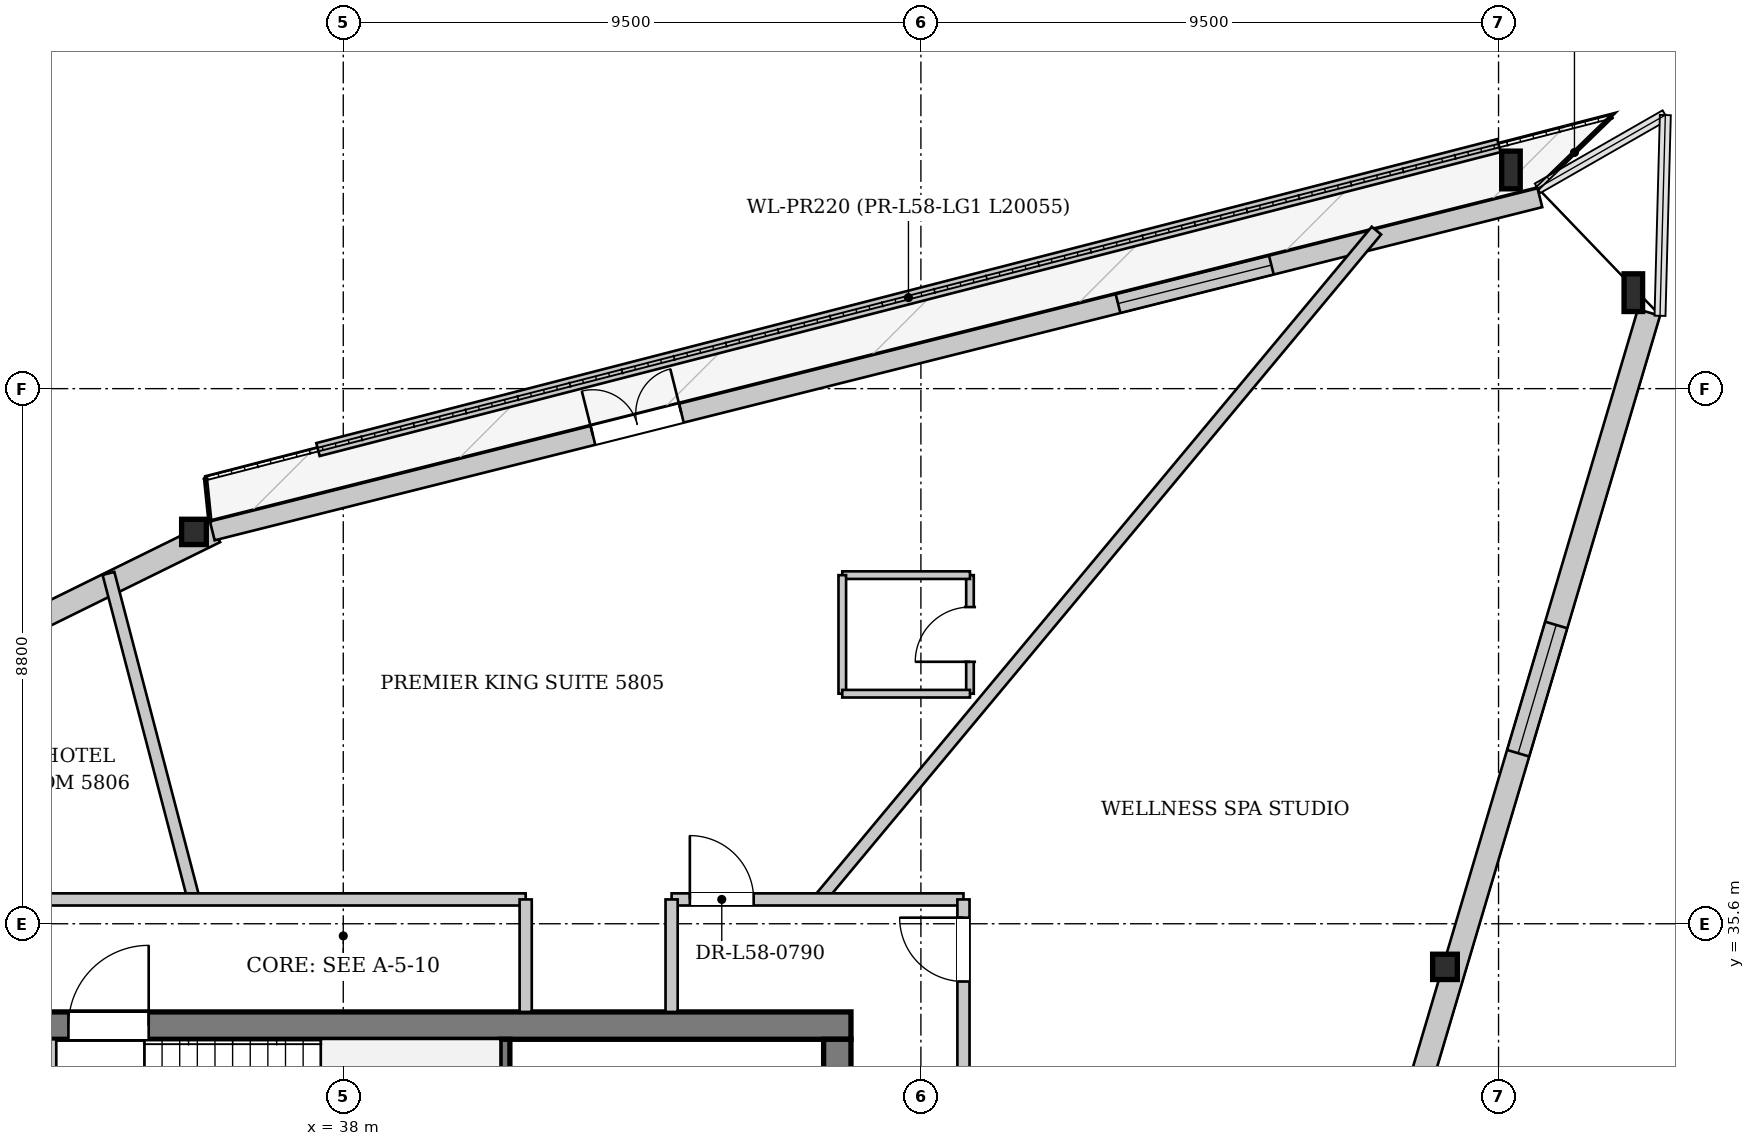
"""IFC4 building model, lengths in metres.
Left out: names, types, materials, properties, quantities, classifications, styles, units other than length and angle.
Written with IfcOpenShell. Run it as: python <this file> out.ifc"""

import sys

from ifc_helpers import new_model, si_unit, direction, frame, frame_2d, origin, origin_2d, place, context, subcontext, project, spatial, rectangle, i_section, extrude, source, transform, mapped, element, fill, save


model = new_model("IFC4")
c1 = context("Model", 3, precision=1e-05, world=origin(), true_north=direction((0.0, 1.0)))
c2 = subcontext(c1, "Body", "Model", "MODEL_VIEW")
j1 = project(units=[si_unit("LENGTHUNIT", "METRE"), si_unit("PLANEANGLEUNIT", "RADIAN")], contexts=[c1])
p1 = place(None, origin())
s1 = spatial("IfcSite", under=j1, at=p1, CompositionType="ELEMENT")
p2 = place(p1, origin())
s2 = spatial("IfcBuilding", under=s1, at=p2, CompositionType="ELEMENT")
p3 = place(p2, frame((0.0, 0.0, 220.25)))
s3 = spatial("IfcBuildingStorey", under=s2, at=p3, CompositionType="ELEMENT", Elevation=220.25)
m1 = source(origin(), c2, "Body", "SweptSolid", [
    extrude(i_section(OverallWidth=0.305, OverallDepth=0.62, WebThickness=0.021, FlangeThickness=0.04, at=origin_2d()), origin(), (0.0, 0.0, 1.0), 3.579),
])
p4 = place(p3, frame((59.656, 45.598, 0.0), z_axis=(-0.245246591305, 0.2126380042, 0.94585368246), x_axis=(-0.65509054937, -0.755550376961, 0.0)))
e1 = element("IfcColumn", 1, at=p4, inside=s3, PredefinedType="COLUMN", context=c2, shape_type="MappedRepresentation", body=[
    mapped(m1, transform((0.0, 0.0, 0.0), x_axis=(1.0, 0.0, 0.0), y_axis=(0.0, 1.0, 0.0), z_axis=(0.0, 0.0, 1.0), scale=1.0)),
])
m2 = source(origin(), c2, "Body", "SweptSolid", [
    extrude(i_section(OverallWidth=0.305, OverallDepth=0.62, WebThickness=0.021, FlangeThickness=0.04, at=origin_2d()), origin(), (0.0, 0.0, 1.0), 3.548),
])
p5 = place(p3, frame((57.641, 47.695, 0.0), z_axis=(-0.246375224897, 0.169778681514, 0.954187847261), x_axis=(-0.567426549776, -0.823424016294, 0.0)))
e2 = element("IfcColumn", 2, at=p5, inside=s3, PredefinedType="COLUMN", context=c2, shape_type="MappedRepresentation", body=[
    mapped(m2, transform((0.0, 0.0, 0.0), x_axis=(1.0, 0.0, 0.0), y_axis=(0.0, 1.0, 0.0), z_axis=(0.0, 0.0, 1.0), scale=1.0)),
])
m3 = source(origin(), c2, "Body", "SweptSolid", [
    extrude(i_section(OverallWidth=0.406, OverallDepth=0.416, WebThickness=0.027, FlangeThickness=0.042, at=origin_2d()), origin(), (0.0, 0.0, 1.0), 3.443),
])
p6 = place(p3, frame((35.807, 42.216, 0.0), z_axis=(-0.152464136085, -0.100200848506, 0.983216393866), x_axis=(0.549216666266, -0.835679994672, 0.0)))
e3 = element("IfcColumn", 3, at=p6, inside=s3, PredefinedType="COLUMN", context=c2, shape_type="MappedRepresentation", body=[
    mapped(m3, transform((0.0, 0.0, 0.0), x_axis=(1.0, 0.0, 0.0), y_axis=(0.0, 1.0, 0.0), z_axis=(0.0, 0.0, 1.0), scale=1.0)),
])
m4 = source(origin(), c2, "Body", "SweptSolid", [
    extrude(i_section(OverallWidth=0.406, OverallDepth=0.416, WebThickness=0.027, FlangeThickness=0.042, at=origin_2d()), origin(), (0.0, 0.0, 1.0), 3.495),
])
p7 = place(p3, frame((56.373, 34.539, 0.0), z_axis=(-0.145518406884, 0.201546137235, 0.968609078949), x_axis=(-0.810760735257, -0.585377681643, 0.0)))
e4 = element("IfcColumn", 4, at=p7, inside=s3, PredefinedType="COLUMN", context=c2, shape_type="MappedRepresentation", body=[
    mapped(m4, transform((0.0, 0.0, 0.0), x_axis=(1.0, 0.0, 0.0), y_axis=(0.0, 1.0, 0.0), z_axis=(0.0, 0.0, 1.0), scale=1.0)),
])
p8 = place(p3, frame((15.696, 32.1, 0.0), z_axis=(0.0, 0.0, 1.0), x_axis=(0.89709423073, 0.441839270766, 0.0)))
e5 = element("IfcWall", 5, at=p8, inside=s3, PredefinedType="SOLIDWALL", context=c2, shape_type="SweptSolid", body=[
    extrude(rectangle(XDim=22.511, YDim=0.38, at=frame_2d((11.255, 0.0))), origin(), (0.0, 0.0, 1.0), 2.822),
])
p9 = place(p8, frame((5.653, 0.0, 0.452)))
e6 = element("IfcOpeningElement", 6, at=p9, cuts=e5, PredefinedType="OPENING", context=c2, shape_type="SweptSolid", body=[
    extrude(rectangle(XDim=2.2, YDim=2.25, at=frame_2d((1.1, 1.125))), frame((0.0, 0.2, 0.0), z_axis=(0.0, -1.0, 0.0), x_axis=(1.0, 0.0, 0.0)), (0.0, 0.0, 1.0), 0.4),
])
p10 = place(p8, frame((15.108, 0.0, 0.452)))
e7 = element("IfcOpeningElement", 7, at=p10, cuts=e5, PredefinedType="OPENING", context=c2, shape_type="SweptSolid", body=[
    extrude(rectangle(XDim=2.2, YDim=2.25, at=frame_2d((1.1, 1.125))), frame((0.0, 0.2, 0.0), z_axis=(0.0, -1.0, 0.0), x_axis=(1.0, 0.0, 0.0)), (0.0, 0.0, 1.0), 0.4),
])
p11 = place(p3, frame((35.846, 42.061, 0.0), z_axis=(0.0, 0.0, 1.0), x_axis=(0.969934169837, 0.243367430408, 0.0)))
e8 = element("IfcWall", 8, at=p11, inside=s3, PredefinedType="SOLIDWALL", context=c2, shape_type="SweptSolid", body=[
    extrude(rectangle(XDim=22.511, YDim=0.32, at=frame_2d((11.256, 0.0))), origin(), (0.0, 0.0, 1.0), 2.822),
])
p12 = place(p11, frame((6.454, 0.0, 0.0)))
e9 = element("IfcOpeningElement", 9, at=p12, cuts=e8, PredefinedType="OPENING", context=c2, shape_type="SweptSolid", body=[
    extrude(rectangle(XDim=1.5, YDim=2.3, at=frame_2d((0.75, 1.15))), frame((0.0, 0.17, 0.0), z_axis=(0.0, -1.0, 0.0), x_axis=(1.0, 0.0, 0.0)), (0.0, 0.0, 1.0), 0.34),
])
p13 = place(p11, frame((15.358, 0.0, 0.352)))
e10 = element("IfcOpeningElement", 10, at=p13, cuts=e8, PredefinedType="OPENING", context=c2, shape_type="SweptSolid", body=[
    extrude(rectangle(XDim=2.6, YDim=2.35, at=frame_2d((1.3, 1.175))), frame((0.0, 0.17, 0.0), z_axis=(0.0, -1.0, 0.0), x_axis=(1.0, 0.0, 0.0)), (0.0, 0.0, 1.0), 0.34),
])
p14 = place(p3, frame((59.474, 45.652, 0.0), z_axis=(0.0, 0.0, 1.0), x_axis=(-0.284530367531, -0.958667027676, 0.0)))
e11 = element("IfcWall", 11, at=p14, inside=s3, PredefinedType="SOLIDWALL", context=c2, shape_type="SweptSolid", body=[
    extrude(rectangle(XDim=23.072, YDim=0.38, at=frame_2d((11.536, 0.0))), origin(), (0.0, 0.0, 1.0), 2.822),
])
p15 = place(p14, frame((5.36, 0.0, 0.452)))
e12 = element("IfcOpeningElement", 12, at=p15, cuts=e11, PredefinedType="OPENING", context=c2, shape_type="SweptSolid", body=[
    extrude(rectangle(XDim=2.2, YDim=2.25, at=frame_2d((1.1, 1.125))), frame((0.0, 0.2, 0.0), z_axis=(0.0, -1.0, 0.0), x_axis=(1.0, 0.0, 0.0)), (0.0, 0.0, 1.0), 0.4),
])
p16 = place(p14, frame((15.512, 0.0, 0.452)))
e13 = element("IfcOpeningElement", 13, at=p16, cuts=e11, PredefinedType="OPENING", context=c2, shape_type="SweptSolid", body=[
    extrude(rectangle(XDim=2.2, YDim=2.25, at=frame_2d((1.1, 1.125))), frame((0.0, 0.2, 0.0), z_axis=(0.0, -1.0, 0.0), x_axis=(1.0, 0.0, 0.0)), (0.0, 0.0, 1.0), 0.4),
])
p17 = place(p3, frame((57.006, 48.396, 0.0), z_axis=(0.0, 0.0, 1.0), x_axis=(-0.968440730426, -0.249243960111, 0.0)))
e14 = element("IfcWall", 14, at=p17, inside=s3, PredefinedType="PARAPET", context=c2, shape_type="SweptSolid", body=[
    extrude(rectangle(XDim=20.055, YDim=0.22, at=frame_2d((10.027, 0.0))), origin(), (0.0, 0.0, 1.0), 0.3),
])
p18 = place(p3, frame((29.65, 33.925, 0.0), z_axis=(0.0, 0.0, 1.0), x_axis=(1.0, 0.0, 0.0)))
e15 = element("IfcWall", 15, at=p18, inside=s3, PredefinedType="SHEAR", context=c2, shape_type="SweptSolid", body=[
    extrude(rectangle(XDim=16.7, YDim=0.45, at=frame_2d((8.35, 0.0))), origin(), (0.0, 0.0, 1.0), 3.33),
])
p19 = place(p18, frame((1.45, 0.0, 0.0)))
e16 = element("IfcOpeningElement", 16, at=p19, cuts=e15, PredefinedType="OPENING", context=c2, shape_type="SweptSolid", body=[
    extrude(rectangle(XDim=0.95, YDim=2.1, at=frame_2d((0.475, 1.05))), frame((0.0, 0.235, 0.0), z_axis=(0.0, -1.0, 0.0), x_axis=(1.0, 0.0, 0.0)), (0.0, 0.0, 1.0), 0.47),
])
p20 = place(p18, frame((3.83, 0.0, 0.0)))
e17 = element("IfcOpeningElement", 17, at=p20, cuts=e15, PredefinedType="OPENING", context=c2, shape_type="SweptSolid", body=[
    extrude(rectangle(XDim=1.32, YDim=2.2, at=frame_2d((0.66, 1.1))), frame((0.0, 0.235, 0.0), z_axis=(0.0, -1.0, 0.0), x_axis=(1.0, 0.0, 0.0)), (0.0, 0.0, 1.0), 0.47),
])
p21 = place(p3, frame((46.125, 33.7, 0.0), z_axis=(0.0, 0.0, 1.0), x_axis=(0.0, -1.0, 0.0)))
e18 = element("IfcWall", 18, at=p21, inside=s3, PredefinedType="SHEAR", context=c2, shape_type="SweptSolid", body=[
    extrude(rectangle(XDim=14.2, YDim=0.45, at=frame_2d((7.1, 0.0))), origin(), (0.0, 0.0, 1.0), 3.33),
])
p22 = place(p21, frame((5.18, 0.0, 0.0)))
e19 = element("IfcOpeningElement", 19, at=p22, cuts=e18, PredefinedType="OPENING", context=c2, shape_type="SweptSolid", body=[
    extrude(rectangle(XDim=1.6, YDim=2.2, at=frame_2d((0.8, 1.1))), frame((0.0, 0.235, 0.0), z_axis=(0.0, -1.0, 0.0), x_axis=(1.0, 0.0, 0.0)), (0.0, 0.0, 1.0), 0.47),
])
p23 = place(p21, frame((2.05, 0.0, 0.0)))
e20 = element("IfcOpeningElement", 20, at=p23, cuts=e18, PredefinedType="OPENING", context=c2, shape_type="SweptSolid", body=[
    extrude(rectangle(XDim=0.95, YDim=2.1, at=frame_2d((0.475, 1.05))), frame((0.0, 0.235, 0.0), z_axis=(0.0, -1.0, 0.0), x_axis=(1.0, 0.0, 0.0)), (0.0, 0.0, 1.0), 0.47),
])
p24 = place(p3, frame((40.66, 30.6, 0.0), z_axis=(0.0, 0.0, 1.0), x_axis=(0.0, 1.0, 0.0)))
e21 = element("IfcWall", 21, at=p24, inside=s3, PredefinedType="PARTITIONING", context=c2, shape_type="SweptSolid", body=[
    extrude(rectangle(XDim=3.1, YDim=0.16, at=frame_2d((1.55, 0.0))), origin(), (0.0, 0.0, 1.0), 3.33),
])
p25 = place(p3, frame((33.2, 28.44, 0.0), z_axis=(0.0, 0.0, 1.0), x_axis=(0.0, 1.0, 0.0)))
e22 = element("IfcWall", 22, at=p25, inside=s3, PredefinedType="PARTITIONING", context=c2, shape_type="SweptSolid", body=[
    extrude(rectangle(XDim=5.26, YDim=0.16, at=frame_2d((2.63, 0.0))), origin(), (0.0, 0.0, 1.0), 3.33),
])
p26 = place(p3, frame((45.83, 36.0, 0.0), z_axis=(0.0, 0.0, 1.0), x_axis=(0.640019986759, 0.768358260545, 0.0)))
e23 = element("IfcWall", 23, at=p26, inside=s3, PredefinedType="PARTITIONING", context=c2, shape_type="SweptSolid", body=[
    extrude(rectangle(XDim=14.315, YDim=0.2, at=frame_2d((7.157, 0.0))), origin(), (0.0, 0.0, 1.0), 2.925),
])
p27 = place(p3, frame((35.541, 36.0, 0.0), z_axis=(0.0, 0.0, 1.0), x_axis=(-0.253105140305, 0.967438777366, 0.0)))
e24 = element("IfcWall", 24, at=p27, inside=s3, PredefinedType="PARTITIONING", context=c2, shape_type="SweptSolid", body=[
    extrude(rectangle(XDim=5.542, YDim=0.2, at=frame_2d((2.771, 0.0))), origin(), (0.0, 0.0, 1.0), 3.33),
])
p28 = place(p3, frame((48.307, 39.383, 0.0), z_axis=(0.0, 0.0, 1.0), x_axis=(0.0, 1.0, 0.0)))
e25 = element("IfcWall", 25, at=p28, inside=s3, PredefinedType="PARTITIONING", context=c2, shape_type="SweptSolid", body=[
    extrude(rectangle(XDim=1.95, YDim=0.125, at=frame_2d((0.975, 0.0))), origin(), (0.0, 0.0, 1.0), 3.33),
])
p29 = place(p28, frame((0.525, 0.0, 0.0)))
e26 = element("IfcOpeningElement", 26, at=p29, cuts=e25, PredefinedType="OPENING", context=c2, shape_type="SweptSolid", body=[
    extrude(rectangle(XDim=0.9, YDim=2.1, at=frame_2d((0.45, 1.05))), frame((0.0, 0.073, 0.0), z_axis=(0.0, -1.0, 0.0), x_axis=(1.0, 0.0, 0.0)), (0.0, 0.0, 1.0), 0.145),
])
p30 = place(p3, frame((48.307, 41.333, 0.0), z_axis=(0.0, 0.0, 1.0), x_axis=(-1.0, 0.0, 0.0)))
e27 = element("IfcWall", 27, at=p30, inside=s3, PredefinedType="PARTITIONING", context=c2, shape_type="SweptSolid", body=[
    extrude(rectangle(XDim=2.1, YDim=0.125, at=frame_2d((1.05, 0.0))), origin(), (0.0, 0.0, 1.0), 3.075),
])
p31 = place(p3, frame((46.207, 41.333, 0.0), z_axis=(0.0, 0.0, 1.0), x_axis=(0.0, -1.0, 0.0)))
e28 = element("IfcWall", 28, at=p31, inside=s3, PredefinedType="PARTITIONING", context=c2, shape_type="SweptSolid", body=[
    extrude(rectangle(XDim=1.95, YDim=0.125, at=frame_2d((0.975, 0.0))), origin(), (0.0, 0.0, 1.0), 3.33),
])
p32 = place(p3, frame((46.207, 39.383, 0.0), z_axis=(0.0, 0.0, 1.0), x_axis=(1.0, 0.0, 0.0)))
e29 = element("IfcWall", 29, at=p32, inside=s3, PredefinedType="PARTITIONING", context=c2, shape_type="SweptSolid", body=[
    extrude(rectangle(XDim=2.1, YDim=0.125, at=frame_2d((1.05, 0.0))), origin(), (0.0, 0.0, 1.0), 3.33),
])
p33 = place(p3, frame((27.8, 36.0, 0.0), z_axis=(0.0, 0.0, 1.0), x_axis=(1.0, 0.0, 0.0)))
e30 = element("IfcWall", 30, at=p33, inside=s3, PredefinedType="PARTITIONING", context=c2, shape_type="SweptSolid", body=[
    extrude(rectangle(XDim=13.2, YDim=0.2, at=frame_2d((6.6, 0.0))), origin(), (0.0, 0.0, 1.0), 3.33),
])
p34 = place(p33, frame((0.3, 0.0, 0.0)))
e31 = element("IfcOpeningElement", 31, at=p34, cuts=e30, PredefinedType="OPENING", context=c2, shape_type="SweptSolid", body=[
    extrude(rectangle(XDim=1.05, YDim=2.2, at=frame_2d((0.525, 1.1))), frame((0.0, 0.11, 0.0), z_axis=(0.0, -1.0, 0.0), x_axis=(1.0, 0.0, 0.0)), (0.0, 0.0, 1.0), 0.22),
])
p35 = place(p3, frame((41.0, 34.15, 0.0), z_axis=(0.0, 0.0, 1.0), x_axis=(0.0, 1.0, 0.0)))
e32 = element("IfcWall", 32, at=p35, inside=s3, PredefinedType="PARTITIONING", context=c2, shape_type="SweptSolid", body=[
    extrude(rectangle(XDim=1.85, YDim=0.2, at=frame_2d((0.925, 0.0))), origin(), (0.0, 0.0, 1.0), 3.33),
])
p36 = place(p3, frame((43.4, 36.0, 0.0), z_axis=(0.0, 0.0, 1.0), x_axis=(1.0, 0.0, 0.0)))
e33 = element("IfcWall", 33, at=p36, inside=s3, PredefinedType="PARTITIONING", context=c2, shape_type="SweptSolid", body=[
    extrude(rectangle(XDim=4.8, YDim=0.2, at=frame_2d((2.4, 0.0))), origin(), (0.0, 0.0, 1.0), 3.33),
])
p37 = place(p36, frame((0.3, 0.0, 0.0)))
e34 = element("IfcOpeningElement", 34, at=p37, cuts=e33, PredefinedType="OPENING", context=c2, shape_type="SweptSolid", body=[
    extrude(rectangle(XDim=1.05, YDim=2.2, at=frame_2d((0.525, 1.1))), frame((0.0, 0.11, 0.0), z_axis=(0.0, -1.0, 0.0), x_axis=(1.0, 0.0, 0.0)), (0.0, 0.0, 1.0), 0.22),
])
p38 = place(p3, frame((43.4, 34.15, 0.0), z_axis=(0.0, 0.0, 1.0), x_axis=(0.0, 1.0, 0.0)))
e35 = element("IfcWall", 35, at=p38, inside=s3, PredefinedType="PARTITIONING", context=c2, shape_type="SweptSolid", body=[
    extrude(rectangle(XDim=1.85, YDim=0.2, at=frame_2d((0.925, 0.0))), origin(), (0.0, 0.0, 1.0), 3.33),
])
p39 = place(p3, frame((48.2, 17.2, 0.0), z_axis=(0.0, 0.0, 1.0), x_axis=(0.0, 1.0, 0.0)))
e36 = element("IfcWall", 36, at=p39, inside=s3, PredefinedType="PARTITIONING", context=c2, shape_type="SweptSolid", body=[
    extrude(rectangle(XDim=18.8, YDim=0.2, at=frame_2d((9.4, 0.0))), origin(), (0.0, 0.0, 1.0), 3.015),
])
p40 = place(p39, frame((2.68, 0.0, 0.0)))
e37 = element("IfcOpeningElement", 37, at=p40, cuts=e36, PredefinedType="OPENING", context=c2, shape_type="SweptSolid", body=[
    extrude(rectangle(XDim=1.05, YDim=2.2, at=frame_2d((0.525, 1.1))), frame((0.0, 0.11, 0.0), z_axis=(0.0, -1.0, 0.0), x_axis=(1.0, 0.0, 0.0)), (0.0, 0.0, 1.0), 0.22),
])
p41 = place(p39, frame((17.45, 0.0, 0.0)))
e38 = element("IfcOpeningElement", 38, at=p41, cuts=e36, PredefinedType="OPENING", context=c2, shape_type="SweptSolid", body=[
    extrude(rectangle(XDim=1.05, YDim=2.2, at=frame_2d((0.525, 1.1))), frame((0.0, 0.11, 0.0), z_axis=(0.0, -1.0, 0.0), x_axis=(1.0, 0.0, 0.0)), (0.0, 0.0, 1.0), 0.22),
])
m5 = source(origin(), c2, "Body", "SweptSolid", [
    extrude(rectangle(XDim=1.5, YDim=2.3, at=frame_2d((0.75, 1.15))), frame((0.0, 0.025, 0.0), z_axis=(0.0, -1.0, 0.0), x_axis=(1.0, 0.0, 0.0)), (0.0, 0.0, 1.0), 0.05),
])
p42 = place(p12, origin())
e39 = element("IfcDoor", 39, at=p42, inside=s3, OperationType="DOUBLE_DOOR_SINGLE_SWING", PredefinedType="DOOR", context=c2, shape_type="MappedRepresentation", body=[
    mapped(m5, transform((0.0, 0.0, 0.0), x_axis=(1.0, 0.0, 0.0), y_axis=(0.0, 1.0, 0.0), z_axis=(0.0, 0.0, 1.0), scale=1.0)),
])
fill(e9, e39)
m6 = source(origin(), c2, "Body", "SweptSolid", [
    extrude(rectangle(XDim=2.6, YDim=2.35, at=frame_2d((1.3, 1.175))), frame((0.0, 0.03, 0.0), z_axis=(0.0, -1.0, 0.0), x_axis=(1.0, 0.0, 0.0)), (0.0, 0.0, 1.0), 0.06),
])
p43 = place(p13, origin())
e40 = element("IfcWindow", 40, at=p43, inside=s3, PartitioningType="SINGLE_PANEL", PredefinedType="WINDOW", context=c2, shape_type="MappedRepresentation", body=[
    mapped(m6, transform((0.0, 0.0, 0.0), x_axis=(1.0, 0.0, 0.0), y_axis=(0.0, 1.0, 0.0), z_axis=(0.0, 0.0, 1.0), scale=1.0)),
])
fill(e10, e40)
m7 = source(origin(), c2, "Body", "SweptSolid", [
    extrude(rectangle(XDim=2.2, YDim=2.25, at=frame_2d((1.1, 1.125))), frame((0.0, 0.03, 0.0), z_axis=(0.0, -1.0, 0.0), x_axis=(1.0, 0.0, 0.0)), (0.0, 0.0, 1.0), 0.06),
])
p44 = place(p15, origin())
e41 = element("IfcWindow", 41, at=p44, inside=s3, PartitioningType="SINGLE_PANEL", PredefinedType="WINDOW", context=c2, shape_type="MappedRepresentation", body=[
    mapped(m7, transform((0.0, 0.0, 0.0), x_axis=(1.0, 0.0, 0.0), y_axis=(0.0, 1.0, 0.0), z_axis=(0.0, 0.0, 1.0), scale=1.0)),
])
fill(e12, e41)
m8 = source(origin(), c2, "Body", "SweptSolid", [
    extrude(rectangle(XDim=1.32, YDim=2.2, at=frame_2d((0.66, 1.1))), frame((0.0, 0.025, 0.0), z_axis=(0.0, -1.0, 0.0), x_axis=(1.0, 0.0, 0.0)), (0.0, 0.0, 1.0), 0.05),
])
p45 = place(p20, origin())
e42 = element("IfcDoor", 42, at=p45, inside=s3, OperationType="SINGLE_SWING_RIGHT", PredefinedType="DOOR", context=c2, shape_type="MappedRepresentation", body=[
    mapped(m8, transform((0.0, 0.0, 0.0), x_axis=(1.0, 0.0, 0.0), y_axis=(0.0, 1.0, 0.0), z_axis=(0.0, 0.0, 1.0), scale=1.0)),
])
fill(e17, e42)
m9 = source(origin(), c2, "Body", "SweptSolid", [
    extrude(rectangle(XDim=0.9, YDim=2.1, at=frame_2d((0.45, 1.05))), frame((0.0, 0.025, 0.0), z_axis=(0.0, -1.0, 0.0), x_axis=(1.0, 0.0, 0.0)), (0.0, 0.0, 1.0), 0.05),
])
p46 = place(p29, origin())
e43 = element("IfcDoor", 43, at=p46, inside=s3, OperationType="SINGLE_SWING_LEFT", PredefinedType="DOOR", context=c2, shape_type="MappedRepresentation", body=[
    mapped(m9, transform((0.0, 0.0, 0.0), x_axis=(1.0, 0.0, 0.0), y_axis=(0.0, 1.0, 0.0), z_axis=(0.0, 0.0, 1.0), scale=1.0)),
])
fill(e26, e43)
m10 = source(origin(), c2, "Body", "SweptSolid", [
    extrude(rectangle(XDim=1.05, YDim=2.2, at=frame_2d((0.525, 1.1))), frame((0.0, 0.025, 0.0), z_axis=(0.0, -1.0, 0.0), x_axis=(1.0, 0.0, 0.0)), (0.0, 0.0, 1.0), 0.05),
])
p47 = place(p37, origin())
e44 = element("IfcDoor", 44, at=p47, inside=s3, OperationType="SINGLE_SWING_LEFT", PredefinedType="DOOR", context=c2, shape_type="MappedRepresentation", body=[
    mapped(m10, transform((0.0, 0.0, 0.0), x_axis=(1.0, 0.0, 0.0), y_axis=(0.0, 1.0, 0.0), z_axis=(0.0, 0.0, 1.0), scale=1.0)),
])
fill(e34, e44)
p48 = place(p41, origin())
e45 = element("IfcDoor", 45, at=p48, inside=s3, OperationType="SINGLE_SWING_RIGHT", PredefinedType="DOOR", context=c2, shape_type="MappedRepresentation", body=[
    mapped(m10, transform((0.0, 0.0, 0.0), x_axis=(1.0, 0.0, 0.0), y_axis=(0.0, 1.0, 0.0), z_axis=(0.0, 0.0, 1.0), scale=1.0)),
])
fill(e38, e45)
save(model, sys.argv[1])
